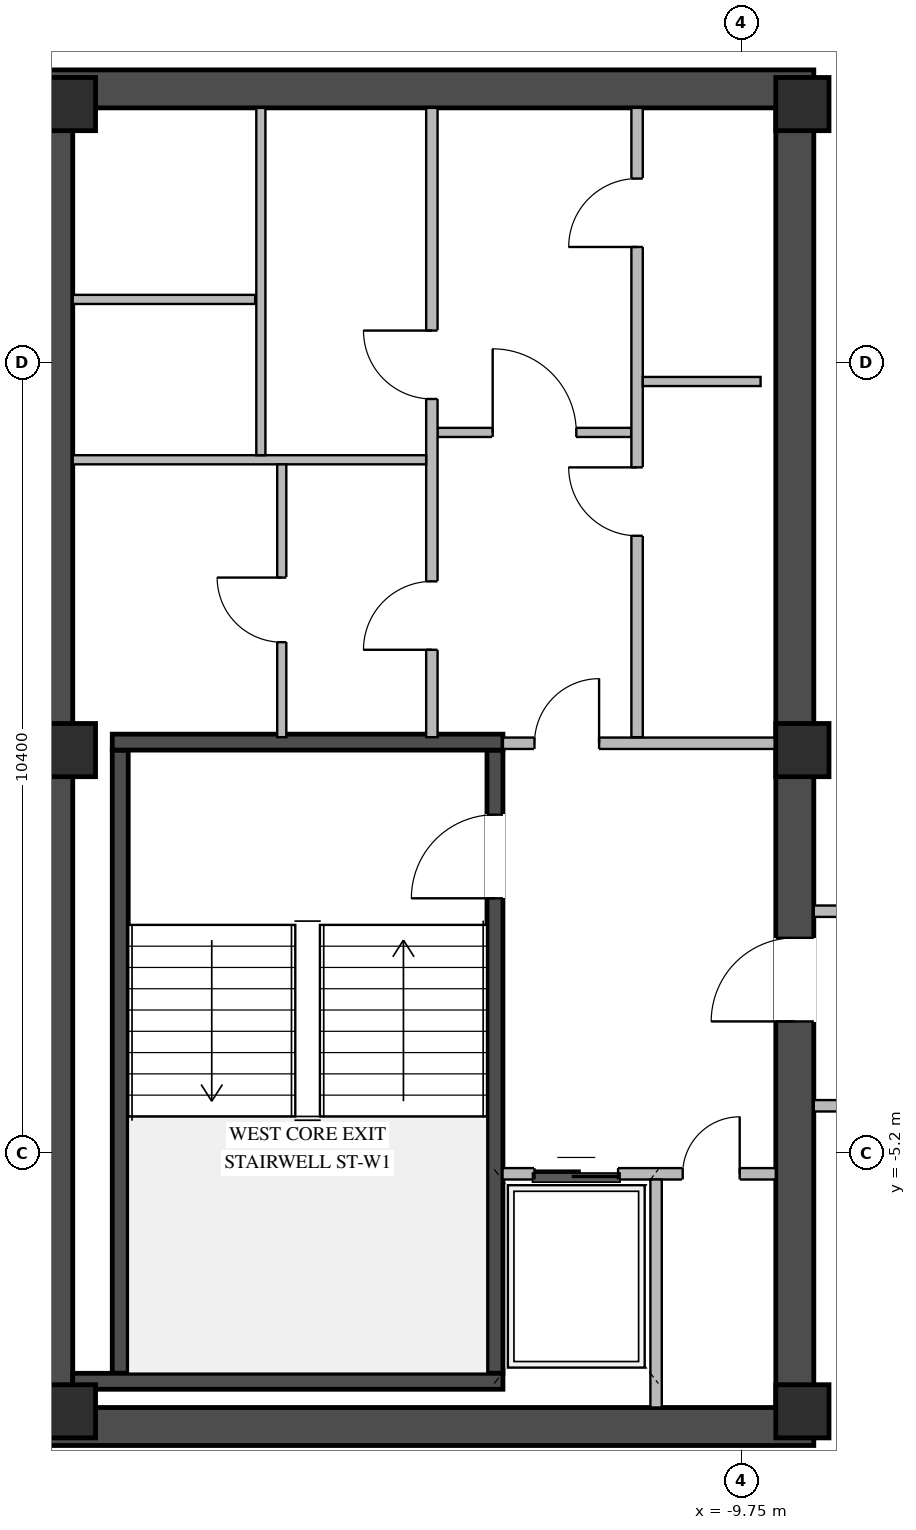
"""IFC4 building model, lengths in metres.
Left out: names, types, materials, properties, quantities, classifications, styles, units other than length and angle.
Written with IfcOpenShell. Run it as: python <this file> out.ifc"""

import sys

from ifc_helpers import new_model, si_unit, direction, frame, frame_2d, origin, origin_2d, place, context, subcontext, project, spatial, rectangle, extrude, element, fill, save


model = new_model("IFC4")
c1 = context("Model", 3, precision=1e-05, world=origin(), true_north=direction((0.0, 1.0)))
c2 = subcontext(c1, "Body", "Model", "MODEL_VIEW")
j1 = project(units=[si_unit("LENGTHUNIT", "METRE"), si_unit("PLANEANGLEUNIT", "RADIAN")], contexts=[c1])
p1 = place(None, origin())
s1 = spatial("IfcSite", under=j1, at=p1, CompositionType="ELEMENT")
p2 = place(p1, origin())
s2 = spatial("IfcBuilding", under=s1, at=p2, CompositionType="ELEMENT")
p3 = place(p2, frame((0.0, 0.0, 294.15)))
s3 = spatial("IfcBuildingStorey", under=s2, at=p3, CompositionType="ELEMENT", Elevation=294.15)
for number, where, z_axis, x_axis in (
    (1, (-19.05, -8.8, 0.0), (0.0, 0.0, 1.0), (1.0, 0.0, 0.0)),
    (2, (-19.05, 8.8, 0.0), (0.0, 0.0, 1.0), (1.0, 0.0, 0.0)),
):
    element("IfcWall", number, at=place(p3, frame(where, z_axis=z_axis, x_axis=x_axis)), inside=s3, PredefinedType="SHEAR", context=c2, shape_type="SweptSolid", body=[
        extrude(rectangle(XDim=10.25, YDim=0.5, at=frame_2d((5.125, 0.0))), origin(), (0.0, 0.0, 1.0), 3.35),
    ])
p4 = place(p3, frame((-18.8, -8.55, 0.0), z_axis=(0.0, 0.0, 1.0), x_axis=(0.0, 1.0, 0.0)))
e3 = element("IfcWall", 3, at=p4, inside=s3, PredefinedType="SHEAR", context=c2, shape_type="SweptSolid", body=[
    extrude(rectangle(XDim=17.1, YDim=0.5, at=frame_2d((8.55, 0.0))), origin(), (0.0, 0.0, 1.0), 3.35),
])
p5 = place(p3, frame((-9.05, -8.55, 0.0), z_axis=(0.0, 0.0, 1.0), x_axis=(0.0, 1.0, 0.0)))
e4 = element("IfcWall", 4, at=p5, inside=s3, PredefinedType="SHEAR", context=c2, shape_type="SweptSolid", body=[
    extrude(rectangle(XDim=17.1, YDim=0.5, at=frame_2d((8.55, 0.0))), origin(), (0.0, 0.0, 1.0), 3.35),
])
p6 = place(p5, frame((5.08, 0.0, 0.0)))
e5 = element("IfcOpeningElement", 5, at=p6, cuts=e4, PredefinedType="OPENING", context=c2, shape_type="SweptSolid", body=[
    extrude(rectangle(XDim=1.1, YDim=2.08, at=frame_2d((0.55, 1.04))), frame((0.0, 0.26, 0.0), z_axis=(0.0, -1.0, 0.0), x_axis=(1.0, 0.0, 0.0)), (0.0, 0.0, 1.0), 0.52),
])
p7 = place(p3, frame((-12.995, -8.1, 0.0), z_axis=(0.0, 0.0, 1.0), x_axis=(0.0, 1.0, 0.0)))
e6 = element("IfcWall", 6, at=p7, inside=s3, PredefinedType="SHEAR", context=c2, shape_type="SweptSolid", body=[
    extrude(rectangle(XDim=8.2, YDim=0.21, at=frame_2d((4.1, 0.0))), origin(), (0.0, 0.0, 1.0), 3.35),
])
p8 = place(p7, frame((6.25, 0.0, 0.0)))
e7 = element("IfcOpeningElement", 7, at=p8, cuts=e6, PredefinedType="OPENING", context=c2, shape_type="SweptSolid", body=[
    extrude(rectangle(XDim=1.1, YDim=2.15, at=frame_2d((0.55, 1.075))), frame((0.0, 0.115, 0.0), z_axis=(0.0, -1.0, 0.0), x_axis=(1.0, 0.0, 0.0)), (0.0, 0.0, 1.0), 0.23),
])
p9 = place(p3, frame((-17.925, -8.1, 0.0), z_axis=(0.0, 0.0, 1.0), x_axis=(0.0, 1.0, 0.0)))
e8 = element("IfcWall", 8, at=p9, inside=s3, PredefinedType="SHEAR", context=c2, shape_type="SweptSolid", body=[
    extrude(rectangle(XDim=8.2, YDim=0.21, at=frame_2d((4.1, 0.0))), origin(), (0.0, 0.0, 1.0), 3.35),
])
p10 = place(p3, frame((-18.55, -8.205, 0.0), z_axis=(0.0, 0.0, 1.0), x_axis=(1.0, 0.0, 0.0)))
e9 = element("IfcWall", 9, at=p10, inside=s3, PredefinedType="SHEAR", context=c2, shape_type="SweptSolid", body=[
    extrude(rectangle(XDim=5.66, YDim=0.21, at=frame_2d((2.83, 0.0))), origin(), (0.0, 0.0, 1.0), 3.35),
])
p11 = place(p3, frame((-12.89, 0.205, 0.0), z_axis=(0.0, 0.0, 1.0), x_axis=(-1.0, 0.0, 0.0)))
e10 = element("IfcWall", 10, at=p11, inside=s3, PredefinedType="SHEAR", context=c2, shape_type="SweptSolid", body=[
    extrude(rectangle(XDim=5.14, YDim=0.21, at=frame_2d((2.57, 0.0))), origin(), (0.0, 0.0, 1.0), 3.35),
])
for number, where, z_axis, x_axis in (
    (11, (-8.95, -8.6, 0.0), (0.0, 0.0, 1.0), (1.0, 0.0, 0.0)),
    (12, (-8.95, 0.1, 0.0), (0.0, 0.0, 1.0), (1.0, 0.0, 0.0)),
    (13, (-8.95, 8.6, 0.0), (0.0, 0.0, 1.0), (1.0, 0.0, 0.0)),
    (14, (-18.6, -8.6, 0.0), (0.0, 0.0, 1.0), (1.0, 0.0, 0.0)),
    (15, (-18.6, 0.1, 0.0), (0.0, 0.0, 1.0), (1.0, 0.0, 0.0)),
    (16, (-18.6, 8.6, 0.0), (0.0, 0.0, 1.0), (1.0, 0.0, 0.0)),
):
    element("IfcColumn", number, at=place(p3, frame(where, z_axis=z_axis, x_axis=x_axis)), inside=s3, PredefinedType="COLUMN", context=c2, shape_type="SweptSolid", body=[
        extrude(rectangle(XDim=0.7, YDim=0.7, at=origin_2d()), origin(), (0.0, 0.0, 1.0), 3.6),
    ])
p12 = place(p3, frame((-12.895, -5.475, 0.0), z_axis=(0.0, 0.0, 1.0), x_axis=(1.0, 0.0, 0.0)))
e17 = element("IfcWall", 17, at=p12, inside=s3, PredefinedType="STANDARD", context=c2, shape_type="SweptSolid", body=[
    extrude(rectangle(XDim=3.595, YDim=0.15, at=frame_2d((1.797, 0.0))), origin(), (0.0, 0.0, 1.0), 3.33),
])
p13 = place(p12, frame((0.42, 0.0, 0.0)))
e18 = element("IfcOpeningElement", 18, at=p13, cuts=e17, PredefinedType="OPENING", context=c2, shape_type="SweptSolid", body=[
    extrude(rectangle(XDim=1.1, YDim=2.15, at=frame_2d((0.55, 1.075))), frame((0.0, 0.085, 0.0), z_axis=(0.0, -1.0, 0.0), x_axis=(1.0, 0.0, 0.0)), (0.0, 0.0, 1.0), 0.17),
])
p14 = place(p12, frame((2.37, 0.0, 0.0)))
e19 = element("IfcOpeningElement", 19, at=p14, cuts=e17, PredefinedType="OPENING", context=c2, shape_type="SweptSolid", body=[
    extrude(rectangle(XDim=0.75, YDim=2.05, at=frame_2d((0.375, 1.025))), frame((0.0, 0.085, 0.0), z_axis=(0.0, -1.0, 0.0), x_axis=(1.0, 0.0, 0.0)), (0.0, 0.0, 1.0), 0.17),
])
p15 = place(p3, frame((-10.875, -8.55, 0.0), z_axis=(0.0, 0.0, 1.0), x_axis=(0.0, 1.0, 0.0)))
e20 = element("IfcWall", 20, at=p15, inside=s3, PredefinedType="STANDARD", context=c2, shape_type="SweptSolid", body=[
    extrude(rectangle(XDim=3.0, YDim=0.15, at=frame_2d((1.5, 0.0))), origin(), (0.0, 0.0, 1.0), 3.33),
])
p16 = place(p3, frame((-12.89, 0.19, 0.0), z_axis=(0.0, 0.0, 1.0), x_axis=(1.0, 0.0, 0.0)))
e21 = element("IfcWall", 21, at=p16, inside=s3, PredefinedType="STANDARD", context=c2, shape_type="SweptSolid", body=[
    extrude(rectangle(XDim=3.59, YDim=0.15, at=frame_2d((1.795, 0.0))), origin(), (0.0, 0.0, 1.0), 2.825),
])
p17 = place(p16, frame((0.415, 0.0, 0.0)))
e22 = element("IfcOpeningElement", 22, at=p17, cuts=e21, PredefinedType="OPENING", context=c2, shape_type="SweptSolid", body=[
    extrude(rectangle(XDim=0.85, YDim=2.04, at=frame_2d((0.425, 1.02))), frame((0.0, 0.085, 0.0), z_axis=(0.0, -1.0, 0.0), x_axis=(1.0, 0.0, 0.0)), (0.0, 0.0, 1.0), 0.17),
])
p18 = place(p3, frame((-13.75, 4.28, 0.0), z_axis=(0.0, 0.0, 1.0), x_axis=(1.0, 0.0, 0.0)))
e23 = element("IfcWall", 23, at=p18, inside=s3, PredefinedType="STANDARD", context=c2, shape_type="SweptSolid", body=[
    extrude(rectangle(XDim=2.55, YDim=0.12, at=frame_2d((1.275, 0.0))), origin(), (0.0, 0.0, 1.0), 3.33),
])
p19 = place(p18, frame((0.725, 0.0, 0.0)))
e24 = element("IfcOpeningElement", 24, at=p19, cuts=e23, PredefinedType="OPENING", context=c2, shape_type="SweptSolid", body=[
    extrude(rectangle(XDim=1.1, YDim=2.1, at=frame_2d((0.55, 1.05))), frame((0.0, 0.07, 0.0), z_axis=(0.0, -1.0, 0.0), x_axis=(1.0, 0.0, 0.0)), (0.0, 0.0, 1.0), 0.14),
])
p20 = place(p3, frame((-11.125, 0.27, 0.0), z_axis=(0.0, 0.0, 1.0), x_axis=(0.0, 1.0, 0.0)))
e25 = element("IfcWall", 25, at=p20, inside=s3, PredefinedType="STANDARD", context=c2, shape_type="SweptSolid", body=[
    extrude(rectangle(XDim=8.28, YDim=0.15, at=frame_2d((4.14, 0.0))), origin(), (0.0, 0.0, 1.0), 3.33),
])
p21 = place(p20, frame((2.65, 0.0, 0.0)))
e26 = element("IfcOpeningElement", 26, at=p21, cuts=e25, PredefinedType="OPENING", context=c2, shape_type="SweptSolid", body=[
    extrude(rectangle(XDim=0.9, YDim=2.05, at=frame_2d((0.45, 1.025))), frame((0.0, 0.085, 0.0), z_axis=(0.0, -1.0, 0.0), x_axis=(1.0, 0.0, 0.0)), (0.0, 0.0, 1.0), 0.17),
])
p22 = place(p20, frame((6.45, 0.0, 0.0)))
e27 = element("IfcOpeningElement", 27, at=p22, cuts=e25, PredefinedType="OPENING", context=c2, shape_type="SweptSolid", body=[
    extrude(rectangle(XDim=0.9, YDim=2.05, at=frame_2d((0.45, 1.025))), frame((0.0, 0.085, 0.0), z_axis=(0.0, -1.0, 0.0), x_axis=(1.0, 0.0, 0.0)), (0.0, 0.0, 1.0), 0.17),
])
p23 = place(p3, frame((-11.05, 4.95, 0.0), z_axis=(0.0, 0.0, 1.0), x_axis=(1.0, 0.0, 0.0)))
e28 = element("IfcWall", 28, at=p23, inside=s3, PredefinedType="STANDARD", context=c2, shape_type="SweptSolid", body=[
    extrude(rectangle(XDim=1.55, YDim=0.12, at=frame_2d((0.775, 0.0))), origin(), (0.0, 0.0, 1.0), 3.33),
])
p24 = place(p3, frame((-13.825, 0.27, 0.0), z_axis=(0.0, 0.0, 1.0), x_axis=(0.0, 1.0, 0.0)))
e29 = element("IfcWall", 29, at=p24, inside=s3, PredefinedType="STANDARD", context=c2, shape_type="SweptSolid", body=[
    extrude(rectangle(XDim=8.28, YDim=0.15, at=frame_2d((4.14, 0.0))), origin(), (0.0, 0.0, 1.0), 3.33),
])
p25 = place(p24, frame((4.45, 0.0, 0.0)))
e30 = element("IfcOpeningElement", 30, at=p25, cuts=e29, PredefinedType="OPENING", context=c2, shape_type="SweptSolid", body=[
    extrude(rectangle(XDim=0.9, YDim=2.05, at=frame_2d((0.45, 1.025))), frame((0.0, 0.085, 0.0), z_axis=(0.0, -1.0, 0.0), x_axis=(1.0, 0.0, 0.0)), (0.0, 0.0, 1.0), 0.17),
])
p26 = place(p24, frame((1.15, 0.0, 0.0)))
e31 = element("IfcOpeningElement", 31, at=p26, cuts=e29, PredefinedType="OPENING", context=c2, shape_type="SweptSolid", body=[
    extrude(rectangle(XDim=0.9, YDim=2.05, at=frame_2d((0.45, 1.025))), frame((0.0, 0.085, 0.0), z_axis=(0.0, -1.0, 0.0), x_axis=(1.0, 0.0, 0.0)), (0.0, 0.0, 1.0), 0.17),
])
p27 = place(p3, frame((-18.55, 3.92, 0.0), z_axis=(0.0, 0.0, 1.0), x_axis=(1.0, 0.0, 0.0)))
e32 = element("IfcWall", 32, at=p27, inside=s3, PredefinedType="STANDARD", context=c2, shape_type="SweptSolid", body=[
    extrude(rectangle(XDim=4.65, YDim=0.12, at=frame_2d((2.325, 0.0))), origin(), (0.0, 0.0, 1.0), 3.33),
])
p28 = place(p3, frame((-18.55, 6.03, 0.0), z_axis=(0.0, 0.0, 1.0), x_axis=(1.0, 0.0, 0.0)))
e33 = element("IfcWall", 33, at=p28, inside=s3, PredefinedType="STANDARD", context=c2, shape_type="SweptSolid", body=[
    extrude(rectangle(XDim=2.4, YDim=0.12, at=frame_2d((1.2, 0.0))), origin(), (0.0, 0.0, 1.0), 3.33),
])
p29 = place(p3, frame((-16.075, 3.98, 0.0), z_axis=(0.0, 0.0, 1.0), x_axis=(0.0, 1.0, 0.0)))
e34 = element("IfcWall", 34, at=p29, inside=s3, PredefinedType="STANDARD", context=c2, shape_type="SweptSolid", body=[
    extrude(rectangle(XDim=4.57, YDim=0.12, at=frame_2d((2.285, 0.0))), origin(), (0.0, 0.0, 1.0), 3.33),
])
p30 = place(p3, frame((-15.8, 0.27, 0.0), z_axis=(0.0, 0.0, 1.0), x_axis=(0.0, 1.0, 0.0)))
e35 = element("IfcWall", 35, at=p30, inside=s3, PredefinedType="STANDARD", context=c2, shape_type="SweptSolid", body=[
    extrude(rectangle(XDim=3.59, YDim=0.12, at=frame_2d((1.795, 0.0))), origin(), (0.0, 0.0, 1.0), 3.33),
])
p31 = place(p30, frame((1.25, 0.0, 0.0)))
e36 = element("IfcOpeningElement", 36, at=p31, cuts=e35, PredefinedType="OPENING", context=c2, shape_type="SweptSolid", body=[
    extrude(rectangle(XDim=0.85, YDim=2.05, at=frame_2d((0.425, 1.025))), frame((0.0, 0.07, 0.0), z_axis=(0.0, -1.0, 0.0), x_axis=(1.0, 0.0, 0.0)), (0.0, 0.0, 1.0), 0.14),
])
p32 = place(p3, frame((-8.8, -2.02, 0.0), z_axis=(0.0, 0.0, 1.0), x_axis=(1.0, 0.0, 0.0)))
e37 = element("IfcWall", 37, at=p32, inside=s3, PredefinedType="STANDARD", context=c2, shape_type="SweptSolid", body=[
    extrude(rectangle(XDim=17.6, YDim=0.15, at=frame_2d((8.8, 0.0))), origin(), (0.0, 0.0, 1.0), 3.33),
])
p33 = place(p32, frame((4.6, 0.0, 0.0)))
e38 = element("IfcOpeningElement", 38, at=p33, cuts=e37, PredefinedType="OPENING", context=c2, shape_type="SweptSolid", body=[
    extrude(rectangle(XDim=1.0, YDim=2.02, at=frame_2d((0.5, 1.01))), frame((0.0, 0.085, 0.0), z_axis=(0.0, -1.0, 0.0), x_axis=(1.0, 0.0, 0.0)), (0.0, 0.0, 1.0), 0.17),
])
p34 = place(p32, frame((13.4, 0.0, 0.0)))
e39 = element("IfcOpeningElement", 39, at=p34, cuts=e37, PredefinedType="OPENING", context=c2, shape_type="SweptSolid", body=[
    extrude(rectangle(XDim=1.0, YDim=2.02, at=frame_2d((0.5, 1.01))), frame((0.0, 0.085, 0.0), z_axis=(0.0, -1.0, 0.0), x_axis=(1.0, 0.0, 0.0)), (0.0, 0.0, 1.0), 0.17),
])
p35 = place(p3, frame((-8.8, -4.58, 0.0), z_axis=(0.0, 0.0, 1.0), x_axis=(1.0, 0.0, 0.0)))
e40 = element("IfcWall", 40, at=p35, inside=s3, PredefinedType="STANDARD", context=c2, shape_type="SweptSolid", body=[
    extrude(rectangle(XDim=17.6, YDim=0.15, at=frame_2d((8.8, 0.0))), origin(), (0.0, 0.0, 1.0), 3.33),
])
p36 = place(p35, frame((4.6, 0.0, 0.0)))
e41 = element("IfcOpeningElement", 41, at=p36, cuts=e40, PredefinedType="OPENING", context=c2, shape_type="SweptSolid", body=[
    extrude(rectangle(XDim=1.0, YDim=2.02, at=frame_2d((0.5, 1.01))), frame((0.0, 0.085, 0.0), z_axis=(0.0, -1.0, 0.0), x_axis=(1.0, 0.0, 0.0)), (0.0, 0.0, 1.0), 0.17),
])
p37 = place(p8, origin())
e42 = element("IfcDoor", 42, at=p37, inside=s3, OperationType="SINGLE_SWING_LEFT", PredefinedType="DOOR", context=c2, shape_type="SweptSolid", body=[
    extrude(rectangle(XDim=1.1, YDim=2.15, at=frame_2d((0.55, 1.075))), frame((0.0, 0.025, 0.0), z_axis=(0.0, -1.0, 0.0), x_axis=(1.0, 0.0, 0.0)), (0.0, 0.0, 1.0), 0.05),
])
fill(e7, e42)
p38 = place(p13, origin())
e43 = element("IfcDoor", 43, at=p38, inside=s3, OperationType="DOUBLE_DOOR_SLIDING", PredefinedType="DOOR", context=c2, shape_type="SweptSolid", body=[
    extrude(rectangle(XDim=1.1, YDim=2.15, at=frame_2d((0.55, 1.075))), frame((0.0, 0.025, 0.0), z_axis=(0.0, -1.0, 0.0), x_axis=(1.0, 0.0, 0.0)), (0.0, 0.0, 1.0), 0.05),
])
fill(e18, e43)
p39 = place(p14, origin())
e44 = element("IfcDoor", 44, at=p39, inside=s3, OperationType="SINGLE_SWING_RIGHT", PredefinedType="DOOR", context=c2, shape_type="SweptSolid", body=[
    extrude(rectangle(XDim=0.75, YDim=2.05, at=frame_2d((0.375, 1.025))), frame((0.0, 0.025, 0.0), z_axis=(0.0, -1.0, 0.0), x_axis=(1.0, 0.0, 0.0)), (0.0, 0.0, 1.0), 0.05),
])
fill(e19, e44)
p40 = place(p17, origin())
e45 = element("IfcDoor", 45, at=p40, inside=s3, OperationType="SINGLE_SWING_RIGHT", PredefinedType="DOOR", context=c2, shape_type="SweptSolid", body=[
    extrude(rectangle(XDim=0.85, YDim=2.04, at=frame_2d((0.425, 1.02))), frame((0.0, 0.025, 0.0), z_axis=(0.0, -1.0, 0.0), x_axis=(1.0, 0.0, 0.0)), (0.0, 0.0, 1.0), 0.05),
])
fill(e22, e45)
p41 = place(p6, origin())
e46 = element("IfcDoor", 46, at=p41, inside=s3, OperationType="SINGLE_SWING_LEFT", PredefinedType="DOOR", context=c2, shape_type="SweptSolid", body=[
    extrude(rectangle(XDim=1.1, YDim=2.08, at=frame_2d((0.55, 1.04))), frame((0.0, 0.205, 0.0), z_axis=(0.0, -1.0, 0.0), x_axis=(1.0, 0.0, 0.0)), (0.0, 0.0, 1.0), 0.05),
])
fill(e5, e46)
p42 = place(p19, origin())
e47 = element("IfcDoor", 47, at=p42, inside=s3, OperationType="SINGLE_SWING_LEFT", PredefinedType="DOOR", context=c2, shape_type="SweptSolid", body=[
    extrude(rectangle(XDim=1.1, YDim=2.1, at=frame_2d((0.55, 1.05))), frame((0.0, 0.025, 0.0), z_axis=(0.0, -1.0, 0.0), x_axis=(1.0, 0.0, 0.0)), (0.0, 0.0, 1.0), 0.05),
])
fill(e24, e47)
p43 = place(p21, origin())
e48 = element("IfcDoor", 48, at=p43, inside=s3, OperationType="SINGLE_SWING_RIGHT", PredefinedType="DOOR", context=c2, shape_type="SweptSolid", body=[
    extrude(rectangle(XDim=0.9, YDim=2.05, at=frame_2d((0.45, 1.025))), frame((0.0, 0.025, 0.0), z_axis=(0.0, -1.0, 0.0), x_axis=(1.0, 0.0, 0.0)), (0.0, 0.0, 1.0), 0.05),
])
fill(e26, e48)
p44 = place(p22, origin())
e49 = element("IfcDoor", 49, at=p44, inside=s3, OperationType="SINGLE_SWING_LEFT", PredefinedType="DOOR", context=c2, shape_type="SweptSolid", body=[
    extrude(rectangle(XDim=0.9, YDim=2.05, at=frame_2d((0.45, 1.025))), frame((0.0, 0.025, 0.0), z_axis=(0.0, -1.0, 0.0), x_axis=(1.0, 0.0, 0.0)), (0.0, 0.0, 1.0), 0.05),
])
fill(e27, e49)
p45 = place(p25, origin())
e50 = element("IfcDoor", 50, at=p45, inside=s3, OperationType="SINGLE_SWING_RIGHT", PredefinedType="DOOR", context=c2, shape_type="SweptSolid", body=[
    extrude(rectangle(XDim=0.9, YDim=2.05, at=frame_2d((0.45, 1.025))), frame((0.0, 0.025, 0.0), z_axis=(0.0, -1.0, 0.0), x_axis=(1.0, 0.0, 0.0)), (0.0, 0.0, 1.0), 0.05),
])
fill(e30, e50)
p46 = place(p26, origin())
e51 = element("IfcDoor", 51, at=p46, inside=s3, OperationType="SINGLE_SWING_LEFT", PredefinedType="DOOR", context=c2, shape_type="SweptSolid", body=[
    extrude(rectangle(XDim=0.9, YDim=2.05, at=frame_2d((0.45, 1.025))), frame((0.0, 0.025, 0.0), z_axis=(0.0, -1.0, 0.0), x_axis=(1.0, 0.0, 0.0)), (0.0, 0.0, 1.0), 0.05),
])
fill(e31, e51)
p47 = place(p31, origin())
e52 = element("IfcDoor", 52, at=p47, inside=s3, OperationType="SINGLE_SWING_RIGHT", PredefinedType="DOOR", context=c2, shape_type="SweptSolid", body=[
    extrude(rectangle(XDim=0.85, YDim=2.05, at=frame_2d((0.425, 1.025))), frame((0.0, 0.025, 0.0), z_axis=(0.0, -1.0, 0.0), x_axis=(1.0, 0.0, 0.0)), (0.0, 0.0, 1.0), 0.05),
])
fill(e36, e52)
save(model, sys.argv[1])
